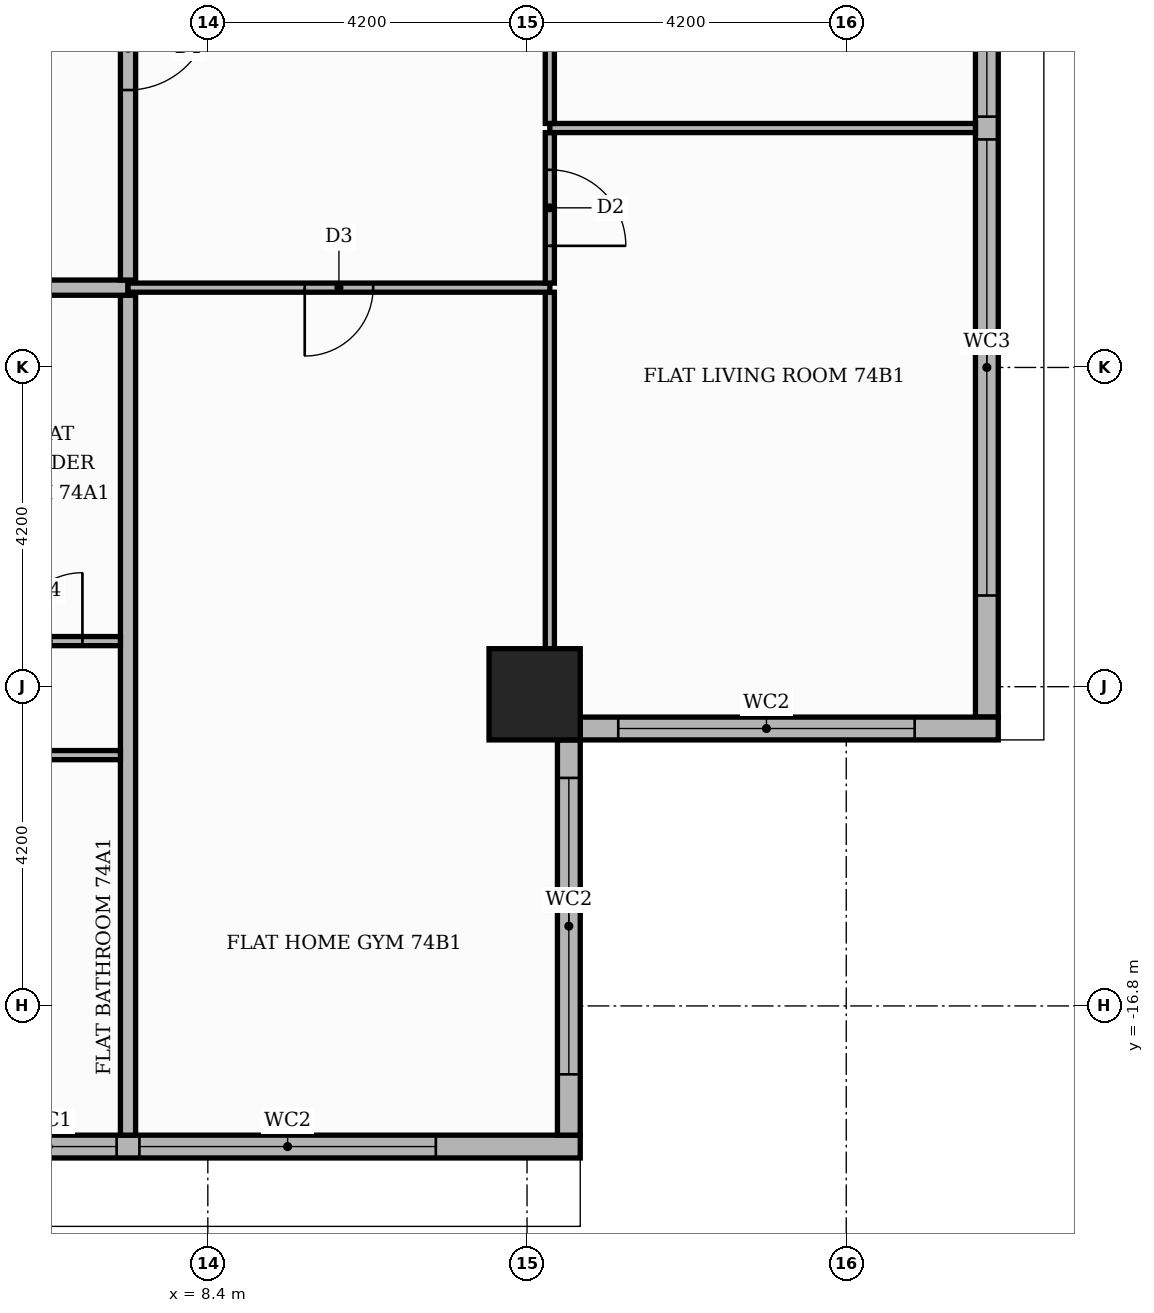
"""IFC4 building model, lengths in metres.
Left out: names, types, materials, properties, quantities, classifications, styles, units other than length and angle.
Written with IfcOpenShell. Run it as: python <this file> out.ifc"""

import sys

from ifc_helpers import new_model, si_unit, direction, frame, frame_2d, origin, origin_2d, place, context, subcontext, project, spatial, rectangle, extrude, element, fill, save


model = new_model("IFC4")
c1 = context("Model", 3, precision=1e-05, world=origin(), true_north=direction((0.0, 1.0)))
c2 = subcontext(c1, "Body", "Model", "MODEL_VIEW")
j1 = project(units=[si_unit("LENGTHUNIT", "METRE"), si_unit("PLANEANGLEUNIT", "RADIAN")], contexts=[c1])
p1 = place(None, origin())
s1 = spatial("IfcSite", under=j1, at=p1, CompositionType="ELEMENT")
p2 = place(p1, origin())
s2 = spatial("IfcBuilding", under=s1, at=p2, CompositionType="ELEMENT")
p3 = place(p2, frame((0.0, 0.0, 308.4)))
s3 = spatial("IfcBuildingStorey", under=s2, at=p3, CompositionType="ELEMENT", Elevation=308.4)
p4 = place(p3, frame((12.7, -12.7, 0.0), z_axis=(0.0, 0.0, 1.0), x_axis=(1.0, 0.0, 0.0)))
e1 = element("IfcColumn", 1, at=p4, inside=s3, PredefinedType="COLUMN", context=c2, shape_type="SweptSolid", body=[
    extrude(rectangle(XDim=1.2, YDim=1.2, at=origin_2d()), origin(), (0.0, 0.0, 1.0), 3.9),
])
p5 = place(p3, frame((18.65, -13.0, 0.0), z_axis=(0.0, 0.0, 1.0), x_axis=(0.0, 1.0, 0.0)))
e2 = element("IfcWall", 2, at=p5, inside=s3, PredefinedType="STANDARD", context=c2, shape_type="SweptSolid", body=[
    extrude(rectangle(XDim=26.3, YDim=0.3, at=frame_2d((13.15, 0.0))), origin(), (0.0, 0.0, 1.0), 3.55),
])
p6 = place(p5, frame((1.6, 0.0, 0.6)))
e3 = element("IfcOpeningElement", 3, at=p6, cuts=e2, PredefinedType="OPENING", context=c2, shape_type="SweptSolid", body=[
    extrude(rectangle(XDim=6.0, YDim=2.4, at=frame_2d((3.0, 1.2))), frame((0.0, 0.16, 0.0), z_axis=(0.0, -1.0, 0.0), x_axis=(1.0, 0.0, 0.0)), (0.0, 0.0, 1.0), 0.32),
])
p7 = place(p5, frame((7.9, 0.0, 0.6)))
e4 = element("IfcOpeningElement", 4, at=p7, cuts=e2, PredefinedType="OPENING", context=c2, shape_type="SweptSolid", body=[
    extrude(rectangle(XDim=3.9, YDim=2.4, at=frame_2d((1.95, 1.2))), frame((0.0, 0.16, 0.0), z_axis=(0.0, -1.0, 0.0), x_axis=(1.0, 0.0, 0.0)), (0.0, 0.0, 1.0), 0.32),
])
p8 = place(p5, frame((14.2, 0.0, 0.6)))
e5 = element("IfcOpeningElement", 5, at=p8, cuts=e2, PredefinedType="OPENING", context=c2, shape_type="SweptSolid", body=[
    extrude(rectangle(XDim=1.8, YDim=2.4, at=frame_2d((0.9, 1.2))), frame((0.0, 0.16, 0.0), z_axis=(0.0, -1.0, 0.0), x_axis=(1.0, 0.0, 0.0)), (0.0, 0.0, 1.0), 0.32),
])
p9 = place(p5, frame((16.3, 0.0, 0.6)))
e6 = element("IfcOpeningElement", 6, at=p9, cuts=e2, PredefinedType="OPENING", context=c2, shape_type="SweptSolid", body=[
    extrude(rectangle(XDim=1.8, YDim=2.4, at=frame_2d((0.9, 1.2))), frame((0.0, 0.16, 0.0), z_axis=(0.0, -1.0, 0.0), x_axis=(1.0, 0.0, 0.0)), (0.0, 0.0, 1.0), 0.32),
])
p10 = place(p5, frame((18.4, 0.0, 0.6)))
e7 = element("IfcOpeningElement", 7, at=p10, cuts=e2, PredefinedType="OPENING", context=c2, shape_type="SweptSolid", body=[
    extrude(rectangle(XDim=1.8, YDim=2.4, at=frame_2d((0.9, 1.2))), frame((0.0, 0.16, 0.0), z_axis=(0.0, -1.0, 0.0), x_axis=(1.0, 0.0, 0.0)), (0.0, 0.0, 1.0), 0.32),
])
p11 = place(p5, frame((20.5, 0.0, 0.6)))
e8 = element("IfcOpeningElement", 8, at=p11, cuts=e2, PredefinedType="OPENING", context=c2, shape_type="SweptSolid", body=[
    extrude(rectangle(XDim=3.9, YDim=2.4, at=frame_2d((1.95, 1.2))), frame((0.0, 0.16, 0.0), z_axis=(0.0, -1.0, 0.0), x_axis=(1.0, 0.0, 0.0)), (0.0, 0.0, 1.0), 0.32),
])
p12 = place(p5, frame((12.175, 0.0, 0.9)))
e9 = element("IfcOpeningElement", 9, at=p12, cuts=e2, PredefinedType="OPENING", context=c2, shape_type="SweptSolid", body=[
    extrude(rectangle(XDim=1.2, YDim=2.1, at=frame_2d((0.6, 1.05))), frame((0.0, 0.16, 0.0), z_axis=(0.0, -1.0, 0.0), x_axis=(1.0, 0.0, 0.0)), (0.0, 0.0, 1.0), 0.32),
])
p13 = place(p3, frame((-13.0, -18.65, 0.0), z_axis=(0.0, 0.0, 1.0), x_axis=(1.0, 0.0, 0.0)))
e10 = element("IfcWall", 10, at=p13, inside=s3, PredefinedType="STANDARD", context=c2, shape_type="SweptSolid", body=[
    extrude(rectangle(XDim=26.3, YDim=0.3, at=frame_2d((13.15, 0.0))), origin(), (0.0, 0.0, 1.0), 3.55),
])
p14 = place(p13, frame((1.6, 0.0, 0.6)))
e11 = element("IfcOpeningElement", 11, at=p14, cuts=e10, PredefinedType="OPENING", context=c2, shape_type="SweptSolid", body=[
    extrude(rectangle(XDim=6.0, YDim=2.4, at=frame_2d((3.0, 1.2))), frame((0.0, 0.16, 0.0), z_axis=(0.0, -1.0, 0.0), x_axis=(1.0, 0.0, 0.0)), (0.0, 0.0, 1.0), 0.32),
])
p15 = place(p13, frame((7.9, 0.0, 0.6)))
e12 = element("IfcOpeningElement", 12, at=p15, cuts=e10, PredefinedType="OPENING", context=c2, shape_type="SweptSolid", body=[
    extrude(rectangle(XDim=3.9, YDim=2.4, at=frame_2d((1.95, 1.2))), frame((0.0, 0.16, 0.0), z_axis=(0.0, -1.0, 0.0), x_axis=(1.0, 0.0, 0.0)), (0.0, 0.0, 1.0), 0.32),
])
p16 = place(p13, frame((14.2, 0.0, 0.6)))
e13 = element("IfcOpeningElement", 13, at=p16, cuts=e10, PredefinedType="OPENING", context=c2, shape_type="SweptSolid", body=[
    extrude(rectangle(XDim=1.8, YDim=2.4, at=frame_2d((0.9, 1.2))), frame((0.0, 0.16, 0.0), z_axis=(0.0, -1.0, 0.0), x_axis=(1.0, 0.0, 0.0)), (0.0, 0.0, 1.0), 0.32),
])
p17 = place(p13, frame((16.3, 0.0, 0.6)))
e14 = element("IfcOpeningElement", 14, at=p17, cuts=e10, PredefinedType="OPENING", context=c2, shape_type="SweptSolid", body=[
    extrude(rectangle(XDim=1.8, YDim=2.4, at=frame_2d((0.9, 1.2))), frame((0.0, 0.16, 0.0), z_axis=(0.0, -1.0, 0.0), x_axis=(1.0, 0.0, 0.0)), (0.0, 0.0, 1.0), 0.32),
])
p18 = place(p13, frame((18.4, 0.0, 0.6)))
e15 = element("IfcOpeningElement", 15, at=p18, cuts=e10, PredefinedType="OPENING", context=c2, shape_type="SweptSolid", body=[
    extrude(rectangle(XDim=1.8, YDim=2.4, at=frame_2d((0.9, 1.2))), frame((0.0, 0.16, 0.0), z_axis=(0.0, -1.0, 0.0), x_axis=(1.0, 0.0, 0.0)), (0.0, 0.0, 1.0), 0.32),
])
p19 = place(p13, frame((20.5, 0.0, 0.6)))
e16 = element("IfcOpeningElement", 16, at=p19, cuts=e10, PredefinedType="OPENING", context=c2, shape_type="SweptSolid", body=[
    extrude(rectangle(XDim=3.9, YDim=2.4, at=frame_2d((1.95, 1.2))), frame((0.0, 0.16, 0.0), z_axis=(0.0, -1.0, 0.0), x_axis=(1.0, 0.0, 0.0)), (0.0, 0.0, 1.0), 0.32),
])
p20 = place(p13, frame((12.175, 0.0, 0.9)))
e17 = element("IfcOpeningElement", 17, at=p20, cuts=e10, PredefinedType="OPENING", context=c2, shape_type="SweptSolid", body=[
    extrude(rectangle(XDim=1.2, YDim=2.1, at=frame_2d((0.6, 1.05))), frame((0.0, 0.16, 0.0), z_axis=(0.0, -1.0, 0.0), x_axis=(1.0, 0.0, 0.0)), (0.0, 0.0, 1.0), 0.32),
])
p21 = place(p3, frame((13.15, -18.5, 0.0), z_axis=(0.0, 0.0, 1.0), x_axis=(0.0, 1.0, 0.0)))
e18 = element("IfcWall", 18, at=p21, inside=s3, PredefinedType="STANDARD", context=c2, shape_type="SweptSolid", body=[
    extrude(rectangle(XDim=5.2, YDim=0.3, at=frame_2d((2.6, 0.0))), origin(), (0.0, 0.0, 1.0), 3.55),
])
p22 = place(p21, frame((0.8, 0.0, 0.6)))
e19 = element("IfcOpeningElement", 19, at=p22, cuts=e18, PredefinedType="OPENING", context=c2, shape_type="SweptSolid", body=[
    extrude(rectangle(XDim=3.9, YDim=2.4, at=frame_2d((1.95, 1.2))), frame((0.0, 0.16, 0.0), z_axis=(0.0, -1.0, 0.0), x_axis=(1.0, 0.0, 0.0)), (0.0, 0.0, 1.0), 0.32),
])
p23 = place(p3, frame((13.3, -13.15, 0.0), z_axis=(0.0, 0.0, 1.0), x_axis=(1.0, 0.0, 0.0)))
e20 = element("IfcWall", 20, at=p23, inside=s3, PredefinedType="STANDARD", context=c2, shape_type="SweptSolid", body=[
    extrude(rectangle(XDim=5.5, YDim=0.3, at=frame_2d((2.75, 0.0))), origin(), (0.0, 0.0, 1.0), 3.55),
])
p24 = place(p23, frame((0.5, 0.0, 0.6)))
e21 = element("IfcOpeningElement", 21, at=p24, cuts=e20, PredefinedType="OPENING", context=c2, shape_type="SweptSolid", body=[
    extrude(rectangle(XDim=3.9, YDim=2.4, at=frame_2d((1.95, 1.2))), frame((0.0, 0.16, 0.0), z_axis=(0.0, -1.0, 0.0), x_axis=(1.0, 0.0, 0.0)), (0.0, 0.0, 1.0), 0.32),
])
p25 = place(p3, frame((7.35, -18.5, 0.0), z_axis=(0.0, 0.0, 1.0), x_axis=(0.0, 1.0, 0.0)))
e22 = element("IfcWall", 22, at=p25, inside=s3, PredefinedType="PARTITIONING", context=c2, shape_type="SweptSolid", body=[
    extrude(rectangle(XDim=11.05, YDim=0.2, at=frame_2d((5.525, 0.0))), origin(), (0.0, 0.0, 1.0), 3.55),
])
p26 = place(p3, frame((-13.0, -13.5, 0.0), z_axis=(0.0, 0.0, 1.0), x_axis=(1.0, 0.0, 0.0)))
e23 = element("IfcWall", 23, at=p26, inside=s3, PredefinedType="PARTITIONING", context=c2, shape_type="SweptSolid", body=[
    extrude(rectangle(XDim=20.25, YDim=0.12, at=frame_2d((10.125, 0.0))), origin(), (0.0, 0.0, 1.0), 3.55),
])
p27 = place(p26, frame((6.2, 0.0, 0.0)))
e24 = element("IfcOpeningElement", 24, at=p27, cuts=e23, PredefinedType="OPENING", context=c2, shape_type="SweptSolid", body=[
    extrude(rectangle(XDim=1.0, YDim=2.1, at=frame_2d((0.5, 1.05))), frame((0.0, 0.07, 0.0), z_axis=(0.0, -1.0, 0.0), x_axis=(1.0, 0.0, 0.0)), (0.0, 0.0, 1.0), 0.14),
])
p28 = place(p26, frame((9.35, 0.0, 0.0)))
e25 = element("IfcOpeningElement", 25, at=p28, cuts=e23, PredefinedType="OPENING", context=c2, shape_type="SweptSolid", body=[
    extrude(rectangle(XDim=1.0, YDim=2.1, at=frame_2d((0.5, 1.05))), frame((0.0, 0.07, 0.0), z_axis=(0.0, -1.0, 0.0), x_axis=(1.0, 0.0, 0.0)), (0.0, 0.0, 1.0), 0.14),
])
p29 = place(p26, frame((13.6, 0.0, 0.0)))
e26 = element("IfcOpeningElement", 26, at=p29, cuts=e23, PredefinedType="OPENING", context=c2, shape_type="SweptSolid", body=[
    extrude(rectangle(XDim=0.9, YDim=2.1, at=frame_2d((0.45, 1.05))), frame((0.0, 0.07, 0.0), z_axis=(0.0, -1.0, 0.0), x_axis=(1.0, 0.0, 0.0)), (0.0, 0.0, 1.0), 0.14),
])
p30 = place(p3, frame((12.9, -12.1, 0.0), z_axis=(0.0, 0.0, 1.0), x_axis=(0.0, 1.0, 0.0)))
e27 = element("IfcWall", 27, at=p30, inside=s3, PredefinedType="PARTITIONING", context=c2, shape_type="SweptSolid", body=[
    extrude(rectangle(XDim=4.69, YDim=0.12, at=frame_2d((2.345, 0.0))), origin(), (0.0, 0.0, 1.0), 3.55),
])
p31 = place(p3, frame((-1.05, -12.0, 0.0), z_axis=(0.0, 0.0, 1.0), x_axis=(1.0, 0.0, 0.0)))
e28 = element("IfcWall", 28, at=p31, inside=s3, PredefinedType="PARTITIONING", context=c2, shape_type="SweptSolid", body=[
    extrude(rectangle(XDim=8.3, YDim=0.12, at=frame_2d((4.15, 0.0))), origin(), (0.0, 0.0, 1.0), 3.55),
])
p32 = place(p31, frame((4.8, 0.0, 0.0)))
e29 = element("IfcOpeningElement", 29, at=p32, cuts=e28, PredefinedType="OPENING", context=c2, shape_type="SweptSolid", body=[
    extrude(rectangle(XDim=0.9, YDim=2.1, at=frame_2d((0.45, 1.05))), frame((0.0, 0.07, 0.0), z_axis=(0.0, -1.0, 0.0), x_axis=(1.0, 0.0, 0.0)), (0.0, 0.0, 1.0), 0.14),
])
p33 = place(p31, frame((6.9, 0.0, 0.0)))
e30 = element("IfcOpeningElement", 30, at=p33, cuts=e28, PredefinedType="OPENING", context=c2, shape_type="SweptSolid", body=[
    extrude(rectangle(XDim=0.9, YDim=2.1, at=frame_2d((0.45, 1.05))), frame((0.0, 0.07, 0.0), z_axis=(0.0, -1.0, 0.0), x_axis=(1.0, 0.0, 0.0)), (0.0, 0.0, 1.0), 0.14),
])
p34 = place(p3, frame((-18.5, -7.35, 0.0), z_axis=(0.0, 0.0, 1.0), x_axis=(1.0, 0.0, 0.0)))
e31 = element("IfcWall", 31, at=p34, inside=s3, PredefinedType="PARTITIONING", context=c2, shape_type="SweptSolid", body=[
    extrude(rectangle(XDim=25.85, YDim=0.2, at=frame_2d((12.925, 0.0))), origin(), (0.0, 0.0, 1.0), 3.55),
])
p35 = place(p34, frame((13.75, 0.0, 0.0)))
e32 = element("IfcOpeningElement", 32, at=p35, cuts=e31, PredefinedType="OPENING", context=c2, shape_type="SweptSolid", body=[
    extrude(rectangle(XDim=1.1, YDim=2.4, at=frame_2d((0.55, 1.2))), frame((0.0, 0.11, 0.0), z_axis=(0.0, -1.0, 0.0), x_axis=(1.0, 0.0, 0.0)), (0.0, 0.0, 1.0), 0.22),
])
p36 = place(p3, frame((7.35, -7.35, 0.0), z_axis=(0.0, 0.0, 1.0), x_axis=(1.0, 0.0, 0.0)))
e33 = element("IfcWall", 33, at=p36, inside=s3, PredefinedType="PARTITIONING", context=c2, shape_type="SweptSolid", body=[
    extrude(rectangle(XDim=5.55, YDim=0.12, at=frame_2d((2.775, 0.0))), origin(), (0.0, 0.0, 1.0), 3.55),
])
p37 = place(p36, frame((2.325, 0.0, 0.0)))
e34 = element("IfcOpeningElement", 34, at=p37, cuts=e33, PredefinedType="OPENING", context=c2, shape_type="SweptSolid", body=[
    extrude(rectangle(XDim=0.9, YDim=2.1, at=frame_2d((0.45, 1.05))), frame((0.0, 0.07, 0.0), z_axis=(0.0, -1.0, 0.0), x_axis=(1.0, 0.0, 0.0)), (0.0, 0.0, 1.0), 0.14),
])
p38 = place(p3, frame((12.9, -7.29, 0.0), z_axis=(0.0, 0.0, 1.0), x_axis=(0.0, 1.0, 0.0)))
e35 = element("IfcWall", 35, at=p38, inside=s3, PredefinedType="PARTITIONING", context=c2, shape_type="SweptSolid", body=[
    extrude(rectangle(XDim=1.98, YDim=0.12, at=frame_2d((0.99, 0.0))), origin(), (0.0, 0.0, 1.0), 3.55),
])
p39 = place(p38, frame((0.49, 0.0, 0.0)))
e36 = element("IfcOpeningElement", 36, at=p39, cuts=e35, PredefinedType="OPENING", context=c2, shape_type="SweptSolid", body=[
    extrude(rectangle(XDim=1.0, YDim=2.1, at=frame_2d((0.5, 1.05))), frame((0.0, 0.07, 0.0), z_axis=(0.0, -1.0, 0.0), x_axis=(1.0, 0.0, 0.0)), (0.0, 0.0, 1.0), 0.14),
])
p40 = place(p3, frame((7.35, -7.25, 0.0), z_axis=(0.0, 0.0, 1.0), x_axis=(0.0, 1.0, 0.0)))
e37 = element("IfcWall", 37, at=p40, inside=s3, PredefinedType="PARTITIONING", context=c2, shape_type="SweptSolid", body=[
    extrude(rectangle(XDim=14.5, YDim=0.2, at=frame_2d((7.25, 0.0))), origin(), (0.0, 0.0, 1.0), 3.55),
])
p41 = place(p40, frame((2.5, 0.0, 0.0)))
e38 = element("IfcOpeningElement", 38, at=p41, cuts=e37, PredefinedType="OPENING", context=c2, shape_type="SweptSolid", body=[
    extrude(rectangle(XDim=1.1, YDim=2.4, at=frame_2d((0.55, 1.2))), frame((0.0, 0.11, 0.0), z_axis=(0.0, -1.0, 0.0), x_axis=(1.0, 0.0, 0.0)), (0.0, 0.0, 1.0), 0.22),
])
p42 = place(p3, frame((12.9, -5.25, 0.0), z_axis=(0.0, 0.0, 1.0), x_axis=(1.0, 0.0, 0.0)))
e39 = element("IfcWall", 39, at=p42, inside=s3, PredefinedType="PARTITIONING", context=c2, shape_type="SweptSolid", body=[
    extrude(rectangle(XDim=5.6, YDim=0.12, at=frame_2d((2.8, 0.0))), origin(), (0.0, 0.0, 1.0), 3.55),
])
p43 = place(p3, frame((12.9, -5.19, 0.0), z_axis=(0.0, 0.0, 1.0), x_axis=(0.0, 1.0, 0.0)))
e40 = element("IfcWall", 40, at=p43, inside=s3, PredefinedType="PARTITIONING", context=c2, shape_type="SweptSolid", body=[
    extrude(rectangle(XDim=4.08, YDim=0.12, at=frame_2d((2.04, 0.0))), origin(), (0.0, 0.0, 1.0), 3.55),
])
p44 = place(p43, frame((1.54, 0.0, 0.0)))
e41 = element("IfcOpeningElement", 41, at=p44, cuts=e40, PredefinedType="OPENING", context=c2, shape_type="SweptSolid", body=[
    extrude(rectangle(XDim=1.0, YDim=2.1, at=frame_2d((0.5, 1.05))), frame((0.0, 0.07, 0.0), z_axis=(0.0, -1.0, 0.0), x_axis=(1.0, 0.0, 0.0)), (0.0, 0.0, 1.0), 0.14),
])
p45 = place(p6, origin())
e42 = element("IfcWindow", 42, at=p45, inside=s3, PartitioningType="SINGLE_PANEL", PredefinedType="WINDOW", context=c2, shape_type="SweptSolid", body=[
    extrude(rectangle(XDim=6.0, YDim=2.4, at=frame_2d((3.0, 1.2))), frame((0.0, 0.03, 0.0), z_axis=(0.0, -1.0, 0.0), x_axis=(1.0, 0.0, 0.0)), (0.0, 0.0, 1.0), 0.06),
])
fill(e3, e42)
p46 = place(p7, origin())
e43 = element("IfcWindow", 43, at=p46, inside=s3, PartitioningType="SINGLE_PANEL", PredefinedType="WINDOW", context=c2, shape_type="SweptSolid", body=[
    extrude(rectangle(XDim=3.9, YDim=2.4, at=frame_2d((1.95, 1.2))), frame((0.0, 0.03, 0.0), z_axis=(0.0, -1.0, 0.0), x_axis=(1.0, 0.0, 0.0)), (0.0, 0.0, 1.0), 0.06),
])
fill(e4, e43)
p47 = place(p18, origin())
e44 = element("IfcWindow", 44, at=p47, inside=s3, PartitioningType="SINGLE_PANEL", PredefinedType="WINDOW", context=c2, shape_type="SweptSolid", body=[
    extrude(rectangle(XDim=1.8, YDim=2.4, at=frame_2d((0.9, 1.2))), frame((0.0, 0.03, 0.0), z_axis=(0.0, -1.0, 0.0), x_axis=(1.0, 0.0, 0.0)), (0.0, 0.0, 1.0), 0.06),
])
fill(e15, e44)
p48 = place(p19, origin())
e45 = element("IfcWindow", 45, at=p48, inside=s3, PartitioningType="SINGLE_PANEL", PredefinedType="WINDOW", context=c2, shape_type="SweptSolid", body=[
    extrude(rectangle(XDim=3.9, YDim=2.4, at=frame_2d((1.95, 1.2))), frame((0.0, 0.03, 0.0), z_axis=(0.0, -1.0, 0.0), x_axis=(1.0, 0.0, 0.0)), (0.0, 0.0, 1.0), 0.06),
])
fill(e16, e45)
p49 = place(p22, origin())
e46 = element("IfcWindow", 46, at=p49, inside=s3, PartitioningType="SINGLE_PANEL", PredefinedType="WINDOW", context=c2, shape_type="SweptSolid", body=[
    extrude(rectangle(XDim=3.9, YDim=2.4, at=frame_2d((1.95, 1.2))), frame((0.0, 0.03, 0.0), z_axis=(0.0, -1.0, 0.0), x_axis=(1.0, 0.0, 0.0)), (0.0, 0.0, 1.0), 0.06),
])
fill(e19, e46)
p50 = place(p24, origin())
e47 = element("IfcWindow", 47, at=p50, inside=s3, PartitioningType="SINGLE_PANEL", PredefinedType="WINDOW", context=c2, shape_type="SweptSolid", body=[
    extrude(rectangle(XDim=3.9, YDim=2.4, at=frame_2d((1.95, 1.2))), frame((0.0, 0.03, 0.0), z_axis=(0.0, -1.0, 0.0), x_axis=(1.0, 0.0, 0.0)), (0.0, 0.0, 1.0), 0.06),
])
fill(e21, e47)
p51 = place(p33, origin())
e48 = element("IfcDoor", 48, at=p51, inside=s3, OperationType="SINGLE_SWING_RIGHT", PredefinedType="DOOR", context=c2, shape_type="SweptSolid", body=[
    extrude(rectangle(XDim=0.9, YDim=2.1, at=frame_2d((0.45, 1.05))), frame((0.0, 0.025, 0.0), z_axis=(0.0, -1.0, 0.0), x_axis=(1.0, 0.0, 0.0)), (0.0, 0.0, 1.0), 0.05),
])
fill(e30, e48)
p52 = place(p41, frame((1.1, 0.0, 0.0), z_axis=(0.0, 0.0, 1.0), x_axis=(-1.0, 0.0, 0.0)))
e49 = element("IfcDoor", 49, at=p52, inside=s3, OperationType="SINGLE_SWING_RIGHT", PredefinedType="DOOR", context=c2, shape_type="SweptSolid", body=[
    extrude(rectangle(XDim=1.1, YDim=2.4, at=frame_2d((0.55, 1.2))), frame((0.0, 0.025, 0.0), z_axis=(0.0, -1.0, 0.0), x_axis=(1.0, 0.0, 0.0)), (0.0, 0.0, 1.0), 0.05),
])
fill(e38, e49)
p53 = place(p37, frame((0.9, 0.0, 0.0), z_axis=(0.0, 0.0, 1.0), x_axis=(-1.0, 0.0, 0.0)))
e50 = element("IfcDoor", 50, at=p53, inside=s3, OperationType="SINGLE_SWING_LEFT", PredefinedType="DOOR", context=c2, shape_type="SweptSolid", body=[
    extrude(rectangle(XDim=0.9, YDim=2.1, at=frame_2d((0.45, 1.05))), frame((0.0, 0.025, 0.0), z_axis=(0.0, -1.0, 0.0), x_axis=(1.0, 0.0, 0.0)), (0.0, 0.0, 1.0), 0.05),
])
fill(e34, e50)
p54 = place(p39, frame((1.0, 0.0, 0.0), z_axis=(0.0, 0.0, 1.0), x_axis=(-1.0, 0.0, 0.0)))
e51 = element("IfcDoor", 51, at=p54, inside=s3, OperationType="SINGLE_SWING_LEFT", PredefinedType="DOOR", context=c2, shape_type="SweptSolid", body=[
    extrude(rectangle(XDim=1.0, YDim=2.1, at=frame_2d((0.5, 1.05))), frame((0.0, 0.025, 0.0), z_axis=(0.0, -1.0, 0.0), x_axis=(1.0, 0.0, 0.0)), (0.0, 0.0, 1.0), 0.05),
])
fill(e36, e51)
save(model, sys.argv[1])
